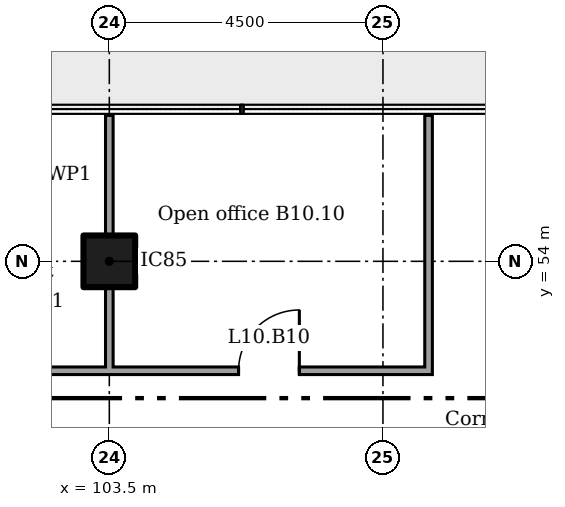
"""IFC4 building model, lengths in metres.
Left out: names, types, materials, properties, quantities, classifications, styles, units other than length and angle.
Written with IfcOpenShell. Run it as: python <this file> out.ifc"""

import sys

from ifc_helpers import new_model, si_unit, direction, frame, frame_2d, origin, origin_2d, place, context, subcontext, project, spatial, rectangle, extrude, element, fill, save


model = new_model("IFC4")
c1 = context("Model", 3, precision=1e-05, world=origin(), true_north=direction((0.0, 1.0)))
c2 = subcontext(c1, "Body", "Model", "MODEL_VIEW")
j1 = project(units=[si_unit("LENGTHUNIT", "METRE"), si_unit("PLANEANGLEUNIT", "RADIAN")], contexts=[c1])
p1 = place(None, origin())
s1 = spatial("IfcSite", under=j1, at=p1, CompositionType="ELEMENT")
p2 = place(p1, origin())
s2 = spatial("IfcBuilding", under=s1, at=p2, CompositionType="ELEMENT")
p3 = place(p2, frame((0.0, 0.0, 47.4)))
s3 = spatial("IfcBuildingStorey", under=s2, at=p3, CompositionType="ELEMENT", Elevation=47.4)
p4 = place(p3, frame((103.5, 54.0, 0.0)))
e1 = element("IfcColumn", 1, at=p4, inside=s3, PredefinedType="COLUMN", context=c2, shape_type="SweptSolid", body=[
    extrude(rectangle(XDim=0.85, YDim=0.85, at=origin_2d()), origin(), (0.0, 0.0, 1.0), 3.6),
])
p5 = place(p3, frame((100.738, 52.2, 0.0)))
e2 = element("IfcWall", 2, at=p5, inside=s3, PredefinedType="PARTITIONING", context=c2, shape_type="SweptSolid", body=[
    extrude(rectangle(XDim=8.075, YDim=0.125, at=frame_2d((4.038, 0.0))), origin(), (0.0, 0.0, 1.0), 3.45),
])
p6 = place(p5, frame((4.887, 0.0, 0.0)))
e3 = element("IfcOpeningElement", 3, at=p6, cuts=e2, PredefinedType="OPENING", context=c2, shape_type="SweptSolid", body=[
    extrude(rectangle(XDim=1.0, YDim=2.1, at=frame_2d((0.5, 1.05))), frame((0.0, 0.073, 0.0), z_axis=(0.0, -1.0, 0.0), x_axis=(1.0, 0.0, 0.0)), (0.0, 0.0, 1.0), 0.145),
])
p7 = place(p3, frame((103.5, 52.2, 0.0), z_axis=(0.0, 0.0, 1.0), x_axis=(0.0, 1.0, 0.0)))
e4 = element("IfcWall", 4, at=p7, inside=s3, PredefinedType="PARTITIONING", context=c2, shape_type="SweptSolid", body=[
    extrude(rectangle(XDim=1.375, YDim=0.125, at=frame_2d((0.688, 0.0))), origin(), (0.0, 0.0, 1.0), 2.842),
])
p8 = place(p3, frame((103.5, 54.425, 0.0), z_axis=(0.0, 0.0, 1.0), x_axis=(0.0, 1.0, 0.0)))
e5 = element("IfcWall", 5, at=p8, inside=s3, PredefinedType="PARTITIONING", context=c2, shape_type="SweptSolid", body=[
    extrude(rectangle(XDim=1.975, YDim=0.125, at=frame_2d((0.987, 0.0))), origin(), (0.0, 0.0, 1.0), 2.842),
])
p9 = place(p3, frame((108.75, 52.262, 0.0), z_axis=(0.0, 0.0, 1.0), x_axis=(0.0, 1.0, 0.0)))
e6 = element("IfcWall", 6, at=p9, inside=s3, PredefinedType="PARTITIONING", context=c2, shape_type="SweptSolid", body=[
    extrude(rectangle(XDim=4.137, YDim=0.125, at=frame_2d((2.069, 0.0))), origin(), (0.0, 0.0, 1.0), 3.45),
])
p10 = place(p6, origin())
e7 = element("IfcDoor", 7, at=p10, inside=s3, OperationType="SINGLE_SWING_LEFT", PredefinedType="DOOR", context=c2, shape_type="SweptSolid", body=[
    extrude(rectangle(XDim=1.0, YDim=2.1, at=frame_2d((0.5, 1.05))), frame((0.0, 0.025, 0.0), z_axis=(0.0, -1.0, 0.0), x_axis=(1.0, 0.0, 0.0)), (0.0, 0.0, 1.0), 0.05),
])
fill(e3, e7)
save(model, sys.argv[1])
